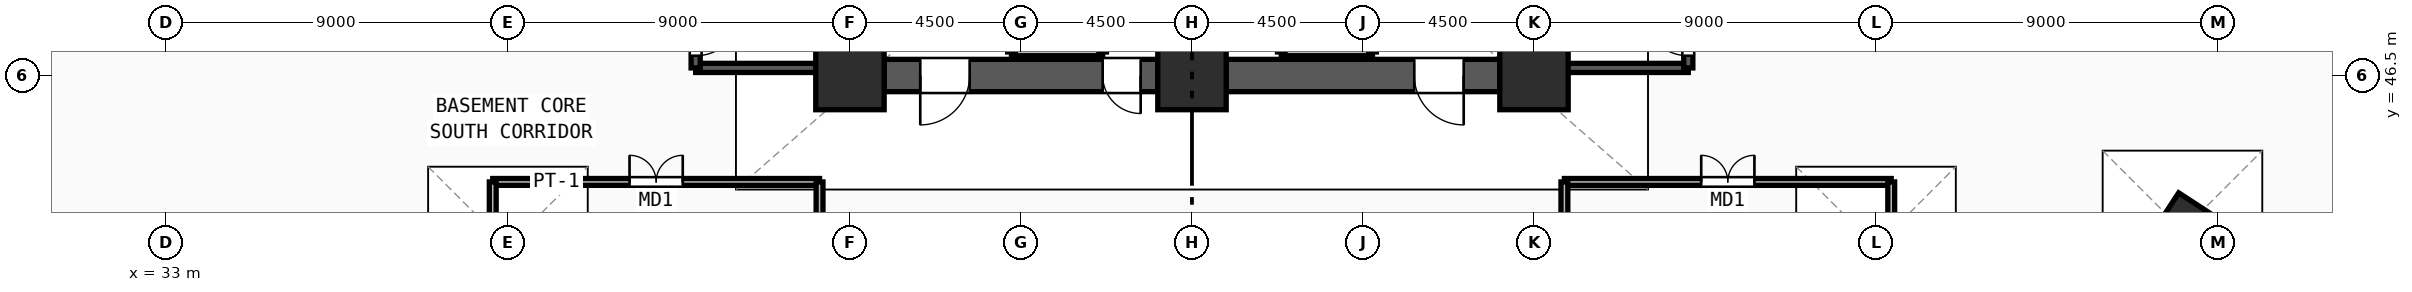
"""IFC4 building model, lengths in metres.
Left out: names, types, materials, properties, quantities, classifications, styles, units other than length and angle.
Written with IfcOpenShell. Run it as: python <this file> out.ifc"""

import sys

from ifc_helpers import new_model, si_unit, direction, frame, frame_2d, origin, origin_2d, place, context, subcontext, project, spatial, rectangle, extrude, source, transform, mapped, element, fill, save


model = new_model("IFC4")
c1 = context("Model", 3, precision=1e-05, world=origin(), true_north=direction((0.0, 1.0)))
c2 = subcontext(c1, "Body", "Model", "MODEL_VIEW")
j1 = project(units=[si_unit("LENGTHUNIT", "METRE"), si_unit("PLANEANGLEUNIT", "RADIAN")], contexts=[c1])
p1 = place(None, origin())
s1 = spatial("IfcSite", under=j1, at=p1, CompositionType="ELEMENT")
p2 = place(p1, origin())
s2 = spatial("IfcBuilding", under=s1, at=p2, CompositionType="ELEMENT")
p3 = place(p2, frame((0.0, 0.0, -9.6)))
s3 = spatial("IfcBuildingStorey", under=s2, at=p3, CompositionType="ELEMENT", Elevation=-9.6)
m1 = source(origin(), c2, "Body", "SweptSolid", [
    extrude(rectangle(XDim=1.8, YDim=1.8, at=origin_2d()), origin(), (0.0, 0.0, 1.0), 4.8),
])
for number, where, z_axis, x_axis in (
    (1, (51.0, 46.5, 0.0), (0.0, 0.0, 1.0), (1.0, 0.0, 0.0)),
    (2, (60.0, 46.5, 0.0), (0.0, 0.0, 1.0), (1.0, 0.0, 0.0)),
    (3, (69.0, 46.5, 0.0), (0.0, 0.0, 1.0), (1.0, 0.0, 0.0)),
):
    element("IfcColumn", number, at=place(p3, frame(where, z_axis=z_axis, x_axis=x_axis)), inside=s3, PredefinedType="COLUMN", context=c2, shape_type="MappedRepresentation", body=[
        mapped(m1, transform((0.0, 0.0, 0.0), x_axis=(1.0, 0.0, 0.0), y_axis=(0.0, 1.0, 0.0), z_axis=(0.0, 0.0, 1.0), scale=1.0)),
    ])
m2 = source(origin(), c2, "Body", "SweptSolid", [
    extrude(rectangle(XDim=1.55, YDim=1.25, at=origin_2d()), origin(), (0.0, 0.0, 1.0), 4.8),
])
p4 = place(p3, frame((86.064, 42.423, 0.0), z_axis=(0.0, 0.0, 1.0), x_axis=(0.546978918409, 0.837146380758, 0.0)))
e4 = element("IfcColumn", 4, at=p4, inside=s3, PredefinedType="COLUMN", context=c2, shape_type="MappedRepresentation", body=[
    mapped(m2, transform((0.0, 0.0, 0.0), x_axis=(1.0, 0.0, 0.0), y_axis=(0.0, 1.0, 0.0), z_axis=(0.0, 0.0, 1.0), scale=1.0)),
])
p5 = place(p3, frame((68.1, 46.5, 0.0), z_axis=(0.0, 0.0, 1.0), x_axis=(-1.0, 0.0, 0.0)))
e5 = element("IfcWall", 5, at=p5, inside=s3, PredefinedType="SHEAR", context=c2, shape_type="SweptSolid", body=[
    extrude(rectangle(XDim=7.2, YDim=0.85, at=frame_2d((3.6, 0.0))), origin(), (0.0, 0.0, 1.0), 4.5),
])
m3 = source(origin(), c2, "Body", "SweptSolid", [
    extrude(rectangle(XDim=1.3, YDim=2.2, at=frame_2d((0.65, 1.1))), frame((0.0, 0.435, 0.0), z_axis=(0.0, -1.0, 0.0), x_axis=(1.0, 0.0, 0.0)), (0.0, 0.0, 1.0), 0.87),
])
p6 = place(p5, frame((0.95, 0.0, 0.0)))
e6 = element("IfcOpeningElement", 6, at=p6, cuts=e5, PredefinedType="OPENING", context=c2, shape_type="MappedRepresentation", body=[
    mapped(m3, transform((0.0, 0.0, 0.0), x_axis=(1.0, 0.0, 0.0), y_axis=(0.0, 1.0, 0.0), z_axis=(0.0, 0.0, 1.0), scale=1.0)),
])
p7 = place(p3, frame((59.1, 46.5, 0.0), z_axis=(0.0, 0.0, 1.0), x_axis=(-1.0, 0.0, 0.0)))
e7 = element("IfcWall", 7, at=p7, inside=s3, PredefinedType="SHEAR", context=c2, shape_type="SweptSolid", body=[
    extrude(rectangle(XDim=7.2, YDim=0.85, at=frame_2d((3.6, 0.0))), origin(), (0.0, 0.0, 1.0), 4.5),
])
p8 = place(p7, frame((4.95, 0.0, 0.0)))
e8 = element("IfcOpeningElement", 8, at=p8, cuts=e7, PredefinedType="OPENING", context=c2, shape_type="MappedRepresentation", body=[
    mapped(m3, transform((0.0, 0.0, 0.0), x_axis=(1.0, 0.0, 0.0), y_axis=(0.0, 1.0, 0.0), z_axis=(0.0, 0.0, 1.0), scale=1.0)),
])
m4 = source(origin(), c2, "Body", "SweptSolid", [
    extrude(rectangle(XDim=1.0, YDim=2.2, at=frame_2d((0.5, 1.1))), frame((0.0, 0.435, 0.0), z_axis=(0.0, -1.0, 0.0), x_axis=(1.0, 0.0, 0.0)), (0.0, 0.0, 1.0), 0.87),
])
p9 = place(p7, frame((0.45, 0.0, 0.0)))
e9 = element("IfcOpeningElement", 9, at=p9, cuts=e7, PredefinedType="OPENING", context=c2, shape_type="MappedRepresentation", body=[
    mapped(m4, transform((0.0, 0.0, 0.0), x_axis=(1.0, 0.0, 0.0), y_axis=(0.0, 1.0, 0.0), z_axis=(0.0, 0.0, 1.0), scale=1.0)),
])
p10 = place(p3, frame((46.94, 46.7, 0.0), z_axis=(0.0, 0.0, 1.0), x_axis=(1.0, 0.0, 0.0)))
e10 = element("IfcWall", 10, at=p10, inside=s3, PredefinedType="SOLIDWALL", context=c2, shape_type="SweptSolid", body=[
    extrude(rectangle(XDim=3.44, YDim=0.24, at=frame_2d((1.72, 0.0))), origin(), (0.0, 0.0, 1.0), 4.5),
])
p11 = place(p3, frame((50.38, 46.7, 0.0), z_axis=(0.0, 0.0, 1.0), x_axis=(0.0, 1.0, 0.0)))
e11 = element("IfcWall", 11, at=p11, inside=s3, PredefinedType="SOLIDWALL", context=c2, shape_type="SweptSolid", body=[
    extrude(rectangle(XDim=7.82, YDim=0.24, at=frame_2d((3.91, 0.0))), origin(), (0.0, 0.0, 1.0), 4.5),
])
p12 = place(p3, frame((46.94, 54.52, 0.0), z_axis=(0.0, 0.0, 1.0), x_axis=(0.0, -1.0, 0.0)))
e12 = element("IfcWall", 12, at=p12, inside=s3, PredefinedType="SOLIDWALL", context=c2, shape_type="SweptSolid", body=[
    extrude(rectangle(XDim=7.82, YDim=0.24, at=frame_2d((3.91, 0.0))), origin(), (0.0, 0.0, 1.0), 4.5),
])
m5 = source(origin(), c2, "Body", "SweptSolid", [
    extrude(rectangle(XDim=1.2, YDim=2.2, at=frame_2d((0.6, 1.1))), frame((0.0, 0.13, 0.0), z_axis=(0.0, -1.0, 0.0), x_axis=(1.0, 0.0, 0.0)), (0.0, 0.0, 1.0), 0.26),
])
p13 = place(p12, frame((6.3, 0.0, 0.0)))
e13 = element("IfcOpeningElement", 13, at=p13, cuts=e12, PredefinedType="OPENING", context=c2, shape_type="MappedRepresentation", body=[
    mapped(m5, transform((0.0, 0.0, 0.0), x_axis=(1.0, 0.0, 0.0), y_axis=(0.0, 1.0, 0.0), z_axis=(0.0, 0.0, 1.0), scale=1.0)),
])
p14 = place(p3, frame((69.62, 46.7, 0.0), z_axis=(0.0, 0.0, 1.0), x_axis=(1.0, 0.0, 0.0)))
e14 = element("IfcWall", 14, at=p14, inside=s3, PredefinedType="SOLIDWALL", context=c2, shape_type="SweptSolid", body=[
    extrude(rectangle(XDim=3.44, YDim=0.24, at=frame_2d((1.72, 0.0))), origin(), (0.0, 0.0, 1.0), 4.5),
])
p15 = place(p3, frame((73.06, 46.7, 0.0), z_axis=(0.0, 0.0, 1.0), x_axis=(0.0, 1.0, 0.0)))
e15 = element("IfcWall", 15, at=p15, inside=s3, PredefinedType="SOLIDWALL", context=c2, shape_type="SweptSolid", body=[
    extrude(rectangle(XDim=7.82, YDim=0.24, at=frame_2d((3.91, 0.0))), origin(), (0.0, 0.0, 1.0), 4.5),
])
p16 = place(p15, frame((0.32, 0.0, 0.0)))
e16 = element("IfcOpeningElement", 16, at=p16, cuts=e15, PredefinedType="OPENING", context=c2, shape_type="MappedRepresentation", body=[
    mapped(m5, transform((0.0, 0.0, 0.0), x_axis=(1.0, 0.0, 0.0), y_axis=(0.0, 1.0, 0.0), z_axis=(0.0, 0.0, 1.0), scale=1.0)),
])
p17 = place(p3, frame((69.62, 54.52, 0.0), z_axis=(0.0, 0.0, 1.0), x_axis=(0.0, -1.0, 0.0)))
e17 = element("IfcWall", 17, at=p17, inside=s3, PredefinedType="SOLIDWALL", context=c2, shape_type="SweptSolid", body=[
    extrude(rectangle(XDim=7.82, YDim=0.24, at=frame_2d((3.91, 0.0))), origin(), (0.0, 0.0, 1.0), 4.5),
])
for number, where, z_axis, x_axis in (
    (18, (55.25, 47.12, 0.0), (0.0, 0.0, 1.0), (1.0, 0.0, 0.0)),
    (19, (62.35, 47.12, 0.0), (0.0, 0.0, 1.0), (1.0, 0.0, 0.0)),
):
    element("IfcWall", number, at=place(p3, frame(where, z_axis=z_axis, x_axis=x_axis)), inside=s3, PredefinedType="SOLIDWALL", context=c2, shape_type="SweptSolid", body=[
        extrude(rectangle(XDim=2.4, YDim=0.2, at=frame_2d((1.2, 0.0))), origin(), (0.0, 0.0, 1.0), 4.5),
    ])
p18 = place(p3, frame((41.6, 43.7, 0.0), z_axis=(0.0, 0.0, 1.0), x_axis=(1.0, 0.0, 0.0)))
e20 = element("IfcWall", 20, at=p18, inside=s3, PredefinedType="PARTITIONING", context=c2, shape_type="SweptSolid", body=[
    extrude(rectangle(XDim=8.6, YDim=0.18, at=frame_2d((4.3, 0.0))), origin(), (0.0, 0.0, 1.0), 4.5),
])
m6 = source(origin(), c2, "Body", "SweptSolid", [
    extrude(rectangle(XDim=1.4, YDim=2.25, at=frame_2d((0.7, 1.125))), frame((0.0, 0.1, 0.0), z_axis=(0.0, -1.0, 0.0), x_axis=(1.0, 0.0, 0.0)), (0.0, 0.0, 1.0), 0.2),
])
p19 = place(p18, frame((3.6, 0.0, 0.0)))
e21 = element("IfcOpeningElement", 21, at=p19, cuts=e20, PredefinedType="OPENING", context=c2, shape_type="MappedRepresentation", body=[
    mapped(m6, transform((0.0, 0.0, 0.0), x_axis=(1.0, 0.0, 0.0), y_axis=(0.0, 1.0, 0.0), z_axis=(0.0, 0.0, 1.0), scale=1.0)),
])
p20 = place(p3, frame((69.8, 43.7, 0.0), z_axis=(0.0, 0.0, 1.0), x_axis=(1.0, 0.0, 0.0)))
e22 = element("IfcWall", 22, at=p20, inside=s3, PredefinedType="PARTITIONING", context=c2, shape_type="SweptSolid", body=[
    extrude(rectangle(XDim=8.6, YDim=0.18, at=frame_2d((4.3, 0.0))), origin(), (0.0, 0.0, 1.0), 4.5),
])
p21 = place(p20, frame((3.6, 0.0, 0.0)))
e23 = element("IfcOpeningElement", 23, at=p21, cuts=e22, PredefinedType="OPENING", context=c2, shape_type="MappedRepresentation", body=[
    mapped(m6, transform((0.0, 0.0, 0.0), x_axis=(1.0, 0.0, 0.0), y_axis=(0.0, 1.0, 0.0), z_axis=(0.0, 0.0, 1.0), scale=1.0)),
])
for number, where, z_axis, x_axis in (
    (24, (41.6, 24.8, 0.0), (0.0, 0.0, 1.0), (0.0, 1.0, 0.0)),
    (25, (50.2, 24.8, 0.0), (0.0, 0.0, 1.0), (0.0, 1.0, 0.0)),
    (26, (69.8, 24.8, 0.0), (0.0, 0.0, 1.0), (0.0, 1.0, 0.0)),
    (27, (78.4, 24.8, 0.0), (0.0, 0.0, 1.0), (0.0, 1.0, 0.0)),
):
    element("IfcWall", number, at=place(p3, frame(where, z_axis=z_axis, x_axis=x_axis)), inside=s3, PredefinedType="PARTITIONING", context=c2, shape_type="SweptSolid", body=[
        extrude(rectangle(XDim=18.9, YDim=0.18, at=frame_2d((9.45, 0.0))), origin(), (0.0, 0.0, 1.0), 4.5),
    ])
m7 = source(origin(), c2, "Body", "SweptSolid", [
    extrude(rectangle(XDim=1.3, YDim=2.2, at=frame_2d((0.65, 1.1))), frame((0.0, 0.025, 0.0), z_axis=(0.0, -1.0, 0.0), x_axis=(1.0, 0.0, 0.0)), (0.0, 0.0, 1.0), 0.05),
])
p22 = place(p8, origin())
e28 = element("IfcDoor", 28, at=p22, inside=s3, OperationType="SINGLE_SWING_RIGHT", PredefinedType="DOOR", context=c2, shape_type="MappedRepresentation", body=[
    mapped(m7, transform((0.0, 0.0, 0.0), x_axis=(1.0, 0.0, 0.0), y_axis=(0.0, 1.0, 0.0), z_axis=(0.0, 0.0, 1.0), scale=1.0)),
])
fill(e8, e28)
m8 = source(origin(), c2, "Body", "SweptSolid", [
    extrude(rectangle(XDim=1.0, YDim=2.2, at=frame_2d((0.5, 1.1))), frame((0.0, 0.025, 0.0), z_axis=(0.0, -1.0, 0.0), x_axis=(1.0, 0.0, 0.0)), (0.0, 0.0, 1.0), 0.05),
])
p23 = place(p9, origin())
e29 = element("IfcDoor", 29, at=p23, inside=s3, OperationType="SINGLE_SWING_LEFT", PredefinedType="DOOR", context=c2, shape_type="MappedRepresentation", body=[
    mapped(m8, transform((0.0, 0.0, 0.0), x_axis=(1.0, 0.0, 0.0), y_axis=(0.0, 1.0, 0.0), z_axis=(0.0, 0.0, 1.0), scale=1.0)),
])
fill(e9, e29)
p24 = place(p6, origin())
e30 = element("IfcDoor", 30, at=p24, inside=s3, OperationType="SINGLE_SWING_LEFT", PredefinedType="DOOR", context=c2, shape_type="MappedRepresentation", body=[
    mapped(m7, transform((0.0, 0.0, 0.0), x_axis=(1.0, 0.0, 0.0), y_axis=(0.0, 1.0, 0.0), z_axis=(0.0, 0.0, 1.0), scale=1.0)),
])
fill(e6, e30)
m9 = source(origin(), c2, "Body", "SweptSolid", [
    extrude(rectangle(XDim=1.2, YDim=2.2, at=frame_2d((0.6, 1.1))), frame((0.0, 0.025, 0.0), z_axis=(0.0, -1.0, 0.0), x_axis=(1.0, 0.0, 0.0)), (0.0, 0.0, 1.0), 0.05),
])
p25 = place(p13, origin())
e31 = element("IfcDoor", 31, at=p25, inside=s3, OperationType="SINGLE_SWING_LEFT", PredefinedType="DOOR", context=c2, shape_type="MappedRepresentation", body=[
    mapped(m9, transform((0.0, 0.0, 0.0), x_axis=(1.0, 0.0, 0.0), y_axis=(0.0, 1.0, 0.0), z_axis=(0.0, 0.0, 1.0), scale=1.0)),
])
fill(e13, e31)
p26 = place(p16, origin())
e32 = element("IfcDoor", 32, at=p26, inside=s3, OperationType="SINGLE_SWING_RIGHT", PredefinedType="DOOR", context=c2, shape_type="MappedRepresentation", body=[
    mapped(m9, transform((0.0, 0.0, 0.0), x_axis=(1.0, 0.0, 0.0), y_axis=(0.0, 1.0, 0.0), z_axis=(0.0, 0.0, 1.0), scale=1.0)),
])
fill(e16, e32)
m10 = source(origin(), c2, "Body", "SweptSolid", [
    extrude(rectangle(XDim=1.4, YDim=2.25, at=frame_2d((0.7, 1.125))), frame((0.0, 0.025, 0.0), z_axis=(0.0, -1.0, 0.0), x_axis=(1.0, 0.0, 0.0)), (0.0, 0.0, 1.0), 0.05),
])
p27 = place(p19, origin())
e33 = element("IfcDoor", 33, at=p27, inside=s3, OperationType="DOUBLE_DOOR_SINGLE_SWING", PredefinedType="DOOR", context=c2, shape_type="MappedRepresentation", body=[
    mapped(m10, transform((0.0, 0.0, 0.0), x_axis=(1.0, 0.0, 0.0), y_axis=(0.0, 1.0, 0.0), z_axis=(0.0, 0.0, 1.0), scale=1.0)),
])
fill(e21, e33)
p28 = place(p21, origin())
e34 = element("IfcDoor", 34, at=p28, inside=s3, OperationType="DOUBLE_DOOR_SINGLE_SWING", PredefinedType="DOOR", context=c2, shape_type="MappedRepresentation", body=[
    mapped(m10, transform((0.0, 0.0, 0.0), x_axis=(1.0, 0.0, 0.0), y_axis=(0.0, 1.0, 0.0), z_axis=(0.0, 0.0, 1.0), scale=1.0)),
])
fill(e23, e34)
save(model, sys.argv[1])
